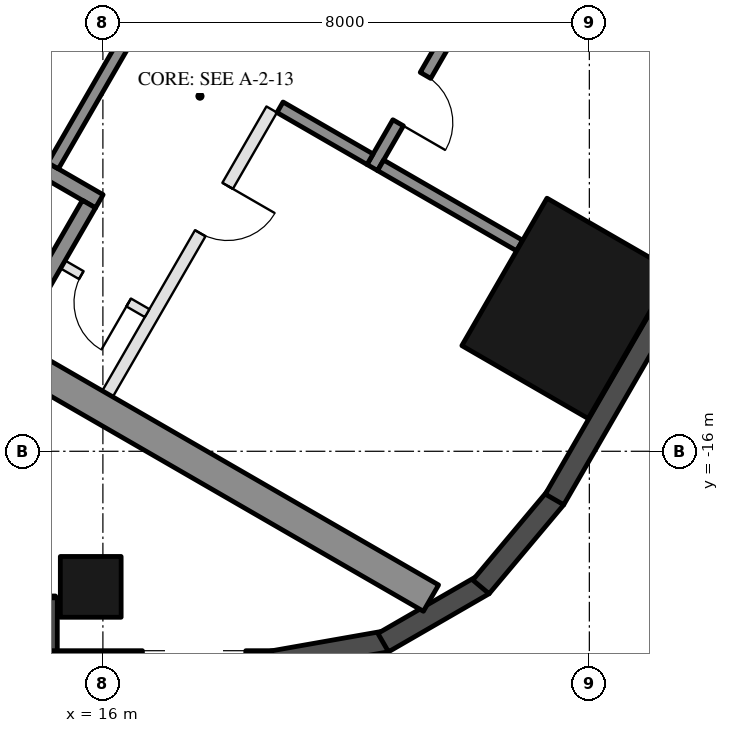
"""IFC4 building model, lengths in metres.
Left out: names, types, materials, properties, quantities, classifications, styles, units other than length and angle.
Written with IfcOpenShell. Run it as: python <this file> out.ifc"""

import sys

from ifc_helpers import new_model, si_unit, direction, frame, frame_2d, origin, origin_2d, place, context, subcontext, project, spatial, rectangle, hollow_rectangle, extrude, element, fill, save


model = new_model("IFC4")
c1 = context("Model", 3, precision=1e-05, world=origin(), true_north=direction((0.0, 1.0)))
c2 = subcontext(c1, "Body", "Model", "MODEL_VIEW")
j1 = project(units=[si_unit("LENGTHUNIT", "METRE"), si_unit("PLANEANGLEUNIT", "RADIAN")], contexts=[c1])
p1 = place(None, origin())
s1 = spatial("IfcSite", under=j1, at=p1, CompositionType="ELEMENT")
p2 = place(p1, origin())
s2 = spatial("IfcBuilding", under=s1, at=p2, CompositionType="ELEMENT")
p3 = place(p2, frame((0.0, 0.0, 61.3)))
s3 = spatial("IfcBuildingStorey", under=s2, at=p3, CompositionType="ELEMENT", Elevation=61.3)
p4 = place(p3, frame((15.8, -18.23, 0.0), z_axis=(0.0, 0.0, 1.0), x_axis=(-1.0, 0.0, 0.0)))
e1 = element("IfcColumn", 1, at=p4, inside=s3, PredefinedType="COLUMN", context=c2, shape_type="SweptSolid", body=[
    extrude(hollow_rectangle(XDim=1.0, YDim=1.0, WallThickness=0.045, at=origin_2d()), origin(), (0.0, 0.0, 1.0), 3.7),
])
p5 = place(p3, frame((23.643, -13.65, 0.0), z_axis=(0.0, 0.0, 1.0), x_axis=(0.5, 0.866025403784, 0.0)))
e2 = element("IfcColumn", 2, at=p5, inside=s3, PredefinedType="COLUMN", context=c2, shape_type="SweptSolid", body=[
    extrude(hollow_rectangle(XDim=2.8, YDim=2.4, WallThickness=0.07, at=origin_2d()), origin(), (0.0, 0.0, 1.0), 3.7),
])
p6 = place(p3, frame((8.48, -18.555, 0.0), z_axis=(0.0, 0.0, 1.0), x_axis=(1.0, 0.0, 0.0)))
e3 = element("IfcWall", 3, at=p6, inside=s3, PredefinedType="SOLIDWALL", context=c2, shape_type="SweptSolid", body=[
    extrude(rectangle(XDim=6.74, YDim=0.35, at=frame_2d((3.37, 0.0))), origin(), (0.0, 0.0, 1.0), 3.55),
])
p7 = place(p6, frame((3.57, 0.0, 0.0)))
e4 = element("IfcOpeningElement", 4, at=p7, cuts=e3, PredefinedType="OPENING", context=c2, shape_type="SweptSolid", body=[
    extrude(rectangle(XDim=2.4, YDim=2.4, at=frame_2d((1.2, 1.2))), frame((0.0, 0.185, 0.0), z_axis=(0.0, -1.0, 0.0), x_axis=(1.0, 0.0, 0.0)), (0.0, 0.0, 1.0), 0.37),
])
p8 = place(p6, frame((0.77, 0.0, 0.3)))
e5 = element("IfcOpeningElement", 5, at=p8, cuts=e3, PredefinedType="OPENING", context=c2, shape_type="SweptSolid", body=[
    extrude(rectangle(XDim=2.5, YDim=2.65, at=frame_2d((1.25, 1.325))), frame((0.0, 0.185, 0.0), z_axis=(0.0, -1.0, 0.0), x_axis=(1.0, 0.0, 0.0)), (0.0, 0.0, 1.0), 0.37),
])
p9 = place(p3, frame((15.075, -18.41, 0.0), z_axis=(0.0, 0.0, 1.0), x_axis=(0.0, -1.0, 0.0)))
e6 = element("IfcWall", 6, at=p9, inside=s3, PredefinedType="SOLIDWALL", context=c2, shape_type="SweptSolid", body=[
    extrude(rectangle(XDim=1.22, YDim=0.35, at=frame_2d((0.61, 0.0))), origin(), (0.0, 0.0, 1.0), 3.55),
])
p10 = place(p3, frame((14.9, -19.455, 0.0), z_axis=(0.0, 0.0, 1.0), x_axis=(1.0, 0.0, 0.0)))
e7 = element("IfcWall", 7, at=p10, inside=s3, PredefinedType="SOLIDWALL", context=c2, shape_type="SweptSolid", body=[
    extrude(rectangle(XDim=3.916, YDim=0.35, at=frame_2d((1.958, 0.0))), origin(), (0.0, 0.0, 1.0), 3.55),
])
p11 = place(p10, frame((1.75, 0.0, 0.3)))
e8 = element("IfcOpeningElement", 8, at=p11, cuts=e7, PredefinedType="OPENING", context=c2, shape_type="SweptSolid", body=[
    extrude(rectangle(XDim=1.7, YDim=2.65, at=frame_2d((0.85, 1.325))), frame((0.0, 0.185, 0.0), z_axis=(0.0, -1.0, 0.0), x_axis=(1.0, 0.0, 0.0)), (0.0, 0.0, 1.0), 0.37),
])
p12 = place(p3, frame((18.785, -19.458, 0.0), z_axis=(0.0, 0.0, 1.0), x_axis=(0.984798995425, 0.173697837091, 0.0)))
e9 = element("IfcWall", 9, at=p12, inside=s3, PredefinedType="SOLIDWALL", context=c2, shape_type="SweptSolid", body=[
    extrude(rectangle(XDim=1.91, YDim=0.35, at=frame_2d((0.955, 0.0))), origin(), (0.0, 0.0, 1.0), 3.55),
])
for number, where, z_axis, x_axis in (
    (10, (20.61, -19.147, 0.0), (0.0, 0.0, 1.0), (0.866, 0.5, 0.0)),
    (11, (22.217, -18.231, 0.0), (0.0, 0.0, 1.0), (0.643, 0.766, 0.0)),
):
    element("IfcWall", number, at=place(p3, frame(where, z_axis=z_axis, x_axis=x_axis)), inside=s3, PredefinedType="SOLIDWALL", context=c2, shape_type="SweptSolid", body=[
        extrude(rectangle(XDim=1.91, YDim=0.35, at=frame_2d((0.955, 0.0))), origin(), (0.0, 0.0, 1.0), 3.55),
    ])
p13 = place(p3, frame((23.427, -16.792, 0.0), z_axis=(0.0, 0.0, 1.0), x_axis=(0.500018773155, 0.866014564827, 0.0)))
e12 = element("IfcWall", 12, at=p13, inside=s3, PredefinedType="SOLIDWALL", context=c2, shape_type="SweptSolid", body=[
    extrude(rectangle(XDim=5.658, YDim=0.35, at=frame_2d((2.829, 0.0))), origin(), (0.0, 0.0, 1.0), 3.55),
])
for number, where, z_axis, x_axis in (
    (13, (8.547, -10.997, 0.0), (0.0, 0.0, 1.0), (0.866, -0.5, 0.0)),
    (14, (13.797, -1.903, 0.0), (0.0, 0.0, 1.0), (0.866, -0.5, 0.0)),
):
    element("IfcWall", number, at=place(p3, frame(where, z_axis=z_axis, x_axis=x_axis)), inside=s3, PredefinedType="SHEAR", context=c2, shape_type="SweptSolid", body=[
        extrude(rectangle(XDim=14.837, YDim=0.5, at=frame_2d((7.418, 0.0))), origin(), (0.0, 0.0, 1.0), 3.5),
    ])
p14 = place(p3, frame((10.356, -8.664, 0.0), z_axis=(0.0, 0.0, 1.0), x_axis=(0.866028629588, -0.499994412703, 0.0)))
e15 = element("IfcWall", 15, at=p14, inside=s3, PredefinedType="SHEAR", context=c2, shape_type="SweptSolid", body=[
    extrude(rectangle(XDim=6.45, YDim=0.25, at=frame_2d((3.225, 0.0))), origin(), (0.0, 0.0, 1.0), 3.5),
])
p15 = place(p14, frame((0.3, 0.0, 0.0)))
e16 = element("IfcOpeningElement", 16, at=p15, cuts=e15, PredefinedType="OPENING", context=c2, shape_type="SweptSolid", body=[
    extrude(rectangle(XDim=1.0, YDim=2.1, at=frame_2d((0.5, 1.05))), frame((0.0, 0.135, 0.0), z_axis=(0.0, -1.0, 0.0), x_axis=(1.0, 0.0, 0.0)), (0.0, 0.0, 1.0), 0.27),
])
p16 = place(p3, frame((14.496, -14.143, 0.0), z_axis=(0.0, 0.0, 1.0), x_axis=(0.500062241894, 0.865989465428, 0.0)))
e17 = element("IfcWall", 17, at=p16, inside=s3, PredefinedType="SHEAR", context=c2, shape_type="SweptSolid", body=[
    extrude(rectangle(XDim=2.55, YDim=0.25, at=frame_2d((1.275, 0.0))), origin(), (0.0, 0.0, 1.0), 3.5),
])
p17 = place(p3, frame((15.181, -11.305, 0.0), z_axis=(0.0, 0.0, 1.0), x_axis=(0.49994636267, 0.866056369097, 0.0)))
e18 = element("IfcWall", 18, at=p17, inside=s3, PredefinedType="SHEAR", context=c2, shape_type="SweptSolid", body=[
    extrude(rectangle(XDim=2.8, YDim=0.2, at=frame_2d((1.4, 0.0))), origin(), (0.0, 0.0, 1.0), 3.5),
])
p18 = place(p3, frame((20.43, -11.333, 0.0), z_axis=(0.0, 0.0, 1.0), x_axis=(0.500001309137, 0.866024647952, 0.0)))
e19 = element("IfcWall", 19, at=p18, inside=s3, PredefinedType="SHEAR", context=c2, shape_type="SweptSolid", body=[
    extrude(rectangle(XDim=2.4, YDim=0.2, at=frame_2d((1.2, 0.0))), origin(), (0.0, 0.0, 1.0), 3.5),
])
p19 = place(p18, frame((0.85, 0.0, 0.0)))
e20 = element("IfcOpeningElement", 20, at=p19, cuts=e19, PredefinedType="OPENING", context=c2, shape_type="SweptSolid", body=[
    extrude(rectangle(XDim=0.9, YDim=2.1, at=frame_2d((0.45, 1.05))), frame((0.0, 0.11, 0.0), z_axis=(0.0, -1.0, 0.0), x_axis=(1.0, 0.0, 0.0)), (0.0, 0.0, 1.0), 0.22),
])
p20 = place(p3, frame((18.913, -10.342, 0.0), z_axis=(0.0, 0.0, 1.0), x_axis=(0.866038183914, -0.499977863513, 0.0)))
e21 = element("IfcWall", 21, at=p20, inside=s3, PredefinedType="SHEAR", context=c2, shape_type="SweptSolid", body=[
    extrude(rectangle(XDim=1.71, YDim=0.2, at=frame_2d((0.855, 0.0))), origin(), (0.0, 0.0, 1.0), 3.5),
])
p21 = place(p3, frame((20.567, -11.297, 0.0), z_axis=(0.0, 0.0, 1.0), x_axis=(0.866060851709, -0.499938597367, 0.0)))
e22 = element("IfcWall", 22, at=p21, inside=s3, PredefinedType="SHEAR", context=c2, shape_type="SweptSolid", body=[
    extrude(rectangle(XDim=2.64, YDim=0.2, at=frame_2d((1.32, 0.0))), origin(), (0.0, 0.0, 1.0), 3.5),
])
p22 = place(p3, frame((16.076, -15.055, 0.0), z_axis=(0.0, 0.0, 1.0), x_axis=(0.499995103361, 0.866028230842, 0.0)))
e23 = element("IfcWall", 23, at=p22, inside=s3, PredefinedType="PARTITIONING", context=c2, shape_type="SweptSolid", body=[
    extrude(rectangle(XDim=5.4, YDim=0.2, at=frame_2d((2.7, 0.0))), origin(), (0.0, 0.0, 1.0), 3.5),
])
p23 = place(p22, frame((3.05, 0.0, 0.0)))
e24 = element("IfcOpeningElement", 24, at=p23, cuts=e23, PredefinedType="OPENING", context=c2, shape_type="SweptSolid", body=[
    extrude(rectangle(XDim=0.9, YDim=2.1, at=frame_2d((0.45, 1.05))), frame((0.0, 0.11, 0.0), z_axis=(0.0, -1.0, 0.0), x_axis=(1.0, 0.0, 0.0)), (0.0, 0.0, 1.0), 0.22),
])
p24 = place(p3, frame((15.342, -12.928, 0.0), z_axis=(0.0, 0.0, 1.0), x_axis=(0.865989903783, -0.500061482766, 0.0)))
e25 = element("IfcWall", 25, at=p24, inside=s3, PredefinedType="PARTITIONING", context=c2, shape_type="SweptSolid", body=[
    extrude(rectangle(XDim=1.6, YDim=0.15, at=frame_2d((0.8, 0.0))), origin(), (0.0, 0.0, 1.0), 3.5),
])
p25 = place(p24, frame((0.35, 0.0, 0.0)))
e26 = element("IfcOpeningElement", 26, at=p25, cuts=e25, PredefinedType="OPENING", context=c2, shape_type="SweptSolid", body=[
    extrude(rectangle(XDim=0.9, YDim=2.1, at=frame_2d((0.45, 1.05))), frame((0.0, 0.085, 0.0), z_axis=(0.0, -1.0, 0.0), x_axis=(1.0, 0.0, 0.0)), (0.0, 0.0, 1.0), 0.17),
])
p26 = place(p25, frame((0.9, 0.0, 0.0), z_axis=(0.0, 0.0, 1.0), x_axis=(-1.0, 0.0, 0.0)))
e27 = element("IfcDoor", 27, at=p26, inside=s3, OperationType="SINGLE_SWING_LEFT", PredefinedType="DOOR", context=c2, shape_type="SweptSolid", body=[
    extrude(rectangle(XDim=0.9, YDim=2.1, at=frame_2d((0.45, 1.05))), frame((0.0, 0.025, 0.0), z_axis=(0.0, -1.0, 0.0), x_axis=(1.0, 0.0, 0.0)), (0.0, 0.0, 1.0), 0.05),
])
fill(e26, e27)
p27 = place(p19, frame((0.9, 0.0, 0.0), z_axis=(0.0, 0.0, 1.0), x_axis=(-1.0, 0.0, 0.0)))
e28 = element("IfcDoor", 28, at=p27, inside=s3, OperationType="SINGLE_SWING_RIGHT", PredefinedType="DOOR", context=c2, shape_type="SweptSolid", body=[
    extrude(rectangle(XDim=0.9, YDim=2.1, at=frame_2d((0.45, 1.05))), frame((0.0, 0.025, 0.0), z_axis=(0.0, -1.0, 0.0), x_axis=(1.0, 0.0, 0.0)), (0.0, 0.0, 1.0), 0.05),
])
fill(e20, e28)
p28 = place(p23, frame((0.9, 0.0, 0.0), z_axis=(0.0, 0.0, 1.0), x_axis=(-1.0, 0.0, 0.0)))
e29 = element("IfcDoor", 29, at=p28, inside=s3, OperationType="SINGLE_SWING_LEFT", PredefinedType="DOOR", context=c2, shape_type="SweptSolid", body=[
    extrude(rectangle(XDim=0.9, YDim=2.1, at=frame_2d((0.45, 1.05))), frame((0.0, 0.025, 0.0), z_axis=(0.0, -1.0, 0.0), x_axis=(1.0, 0.0, 0.0)), (0.0, 0.0, 1.0), 0.05),
])
fill(e24, e29)
save(model, sys.argv[1])
